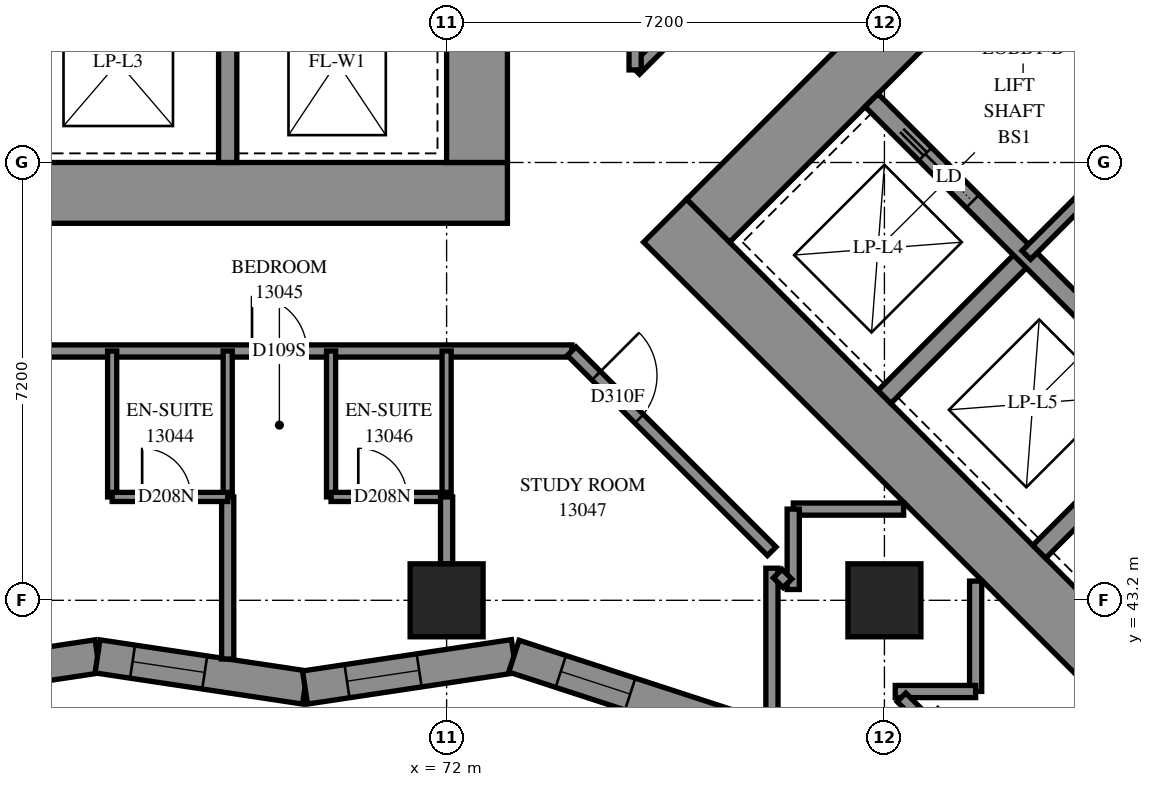
"""IFC4 building model, lengths in metres.
Left out: names, types, materials, properties, quantities, classifications, styles, units other than length and angle.
Written with IfcOpenShell. Run it as: python <this file> out.ifc"""

import sys

from ifc_helpers import new_model, si_unit, direction, frame, frame_2d, origin, origin_2d, place, context, subcontext, project, spatial, polyline, rectangle, outline, extrude, element, fill, save


model = new_model("IFC4")
c1 = context("Model", 3, precision=1e-05, world=origin(), true_north=direction((0.0, 1.0)))
c2 = subcontext(c1, "Body", "Model", "MODEL_VIEW")
j1 = project(units=[si_unit("LENGTHUNIT", "METRE"), si_unit("PLANEANGLEUNIT", "RADIAN")], contexts=[c1])
p1 = place(None, origin())
s1 = spatial("IfcSite", under=j1, at=p1, CompositionType="ELEMENT")
p2 = place(p1, origin())
s2 = spatial("IfcBuilding", under=s1, at=p2, CompositionType="ELEMENT")
p3 = place(p2, frame((0.0, 0.0, 50.8)))
s3 = spatial("IfcBuildingStorey", under=s2, at=p3, CompositionType="ELEMENT", Elevation=50.8)
for number, where, z_axis, x_axis in (
    (1, (72.0, 43.2, 0.0), (0.0, 0.0, 1.0), (1.0, 0.0, 0.0)),
    (2, (79.2, 43.2, 0.0), (0.0, 0.0, 1.0), (1.0, 0.0, 0.0)),
):
    element("IfcColumn", number, at=place(p3, frame(where, z_axis=z_axis, x_axis=x_axis)), inside=s3, PredefinedType="COLUMN", context=c2, shape_type="SweptSolid", body=[
        extrude(rectangle(XDim=1.2, YDim=1.2, at=origin_2d()), origin(), (0.0, 0.0, 1.0), 3.1),
    ])
p4 = place(p3, frame((56.6, 49.9, -0.3), z_axis=(0.0, 0.0, 1.0), x_axis=(1.0, 0.0, 0.0)))
e3 = element("IfcWall", 3, at=p4, inside=s3, PredefinedType="SHEAR", context=c2, shape_type="SweptSolid", body=[
    extrude(rectangle(XDim=16.4, YDim=1.0, at=frame_2d((8.2, 0.0))), origin(), (0.0, 0.0, 1.0), 2.7),
])
p5 = place(p3, frame((72.5, 50.4, -0.3), z_axis=(0.0, 0.0, 1.0), x_axis=(0.0, 1.0, 0.0)))
e4 = element("IfcWall", 4, at=p5, inside=s3, PredefinedType="SHEAR", context=c2, shape_type="SweptSolid", body=[
    extrude(rectangle(XDim=14.4, YDim=1.0, at=frame_2d((7.2, 0.0))), origin(), (0.0, 0.0, 1.0), 2.7),
])
p6 = place(p5, frame((4.55, 0.0, 0.3)))
e5 = element("IfcOpeningElement", 5, at=p6, cuts=e4, PredefinedType="OPENING", context=c2, shape_type="SweptSolid", body=[
    extrude(rectangle(XDim=1.1, YDim=2.1, at=frame_2d((0.55, 1.05))), frame((0.0, 0.51, 0.0), z_axis=(0.0, -1.0, 0.0), x_axis=(1.0, 0.0, 0.0)), (0.0, 0.0, 1.0), 1.02),
])
p7 = place(p5, frame((11.35, 0.0, 0.3)))
e6 = element("IfcOpeningElement", 6, at=p7, cuts=e4, PredefinedType="OPENING", context=c2, shape_type="SweptSolid", body=[
    extrude(rectangle(XDim=1.1, YDim=2.1, at=frame_2d((0.55, 1.05))), frame((0.0, 0.51, 0.0), z_axis=(0.0, -1.0, 0.0), x_axis=(1.0, 0.0, 0.0)), (0.0, 0.0, 1.0), 1.02),
])
p8 = place(p3, frame((68.4, 50.4, 0.0), z_axis=(0.0, 0.0, 1.0), x_axis=(0.0, 1.0, 0.0)))
e7 = element("IfcWall", 7, at=p8, inside=s3, PredefinedType="SOLIDWALL", context=c2, shape_type="SweptSolid", body=[
    extrude(rectangle(XDim=3.3, YDim=0.3, at=frame_2d((1.65, 0.0))), origin(), (0.0, 0.0, 1.0), 3.1),
])
p9 = place(p3, frame((75.594, 49.443, -0.3), z_axis=(0.0, 0.0, 1.0), x_axis=(0.7071037324, -0.70710983, 0.0)))
e8 = element("IfcWall", 8, at=p9, inside=s3, PredefinedType="SHEAR", context=c2, shape_type="SweptSolid", body=[
    extrude(rectangle(XDim=16.4, YDim=1.0, at=frame_2d((8.2, 0.0))), origin(), (0.0, 0.0, 1.0), 2.7),
])
p10 = place(p3, frame((76.301, 49.443, -0.3), z_axis=(0.0, 0.0, 1.0), x_axis=(0.7071067812, 0.7071067812, 0.0)))
e9 = element("IfcWall", 9, at=p10, inside=s3, PredefinedType="SHEAR", context=c2, shape_type="SweptSolid", body=[
    extrude(rectangle(XDim=14.4, YDim=1.0, at=frame_2d((7.2, 0.0))), origin(), (0.0, 0.0, 1.0), 2.7),
])
p11 = place(p10, frame((4.55, 0.0, 0.3)))
e10 = element("IfcOpeningElement", 10, at=p11, cuts=e9, PredefinedType="OPENING", context=c2, shape_type="SweptSolid", body=[
    extrude(rectangle(XDim=1.1, YDim=2.1, at=frame_2d((0.55, 1.05))), frame((0.0, 0.51, 0.0), z_axis=(0.0, -1.0, 0.0), x_axis=(1.0, 0.0, 0.0)), (0.0, 0.0, 1.0), 1.02),
])
p12 = place(p10, frame((11.35, 0.0, 0.3)))
e11 = element("IfcOpeningElement", 11, at=p12, cuts=e9, PredefinedType="OPENING", context=c2, shape_type="SweptSolid", body=[
    extrude(rectangle(XDim=1.1, YDim=2.1, at=frame_2d((0.55, 1.05))), frame((0.0, 0.51, 0.0), z_axis=(0.0, -1.0, 0.0), x_axis=(1.0, 0.0, 0.0)), (0.0, 0.0, 1.0), 1.02),
])
p13 = place(p3, frame((79.2, 46.544, 0.0), z_axis=(0.0, 0.0, 1.0), x_axis=(0.7071219326, 0.7070916295, 0.0)))
e12 = element("IfcWall", 12, at=p13, inside=s3, PredefinedType="SOLIDWALL", context=c2, shape_type="SweptSolid", body=[
    extrude(rectangle(XDim=3.3, YDim=0.3, at=frame_2d((1.65, 0.0))), origin(), (0.0, 0.0, 1.0), 3.1),
])
p14 = place(p3, frame((81.746, 43.999, 0.0), z_axis=(0.0, 0.0, 1.0), x_axis=(0.7071067812, 0.7071067812, 0.0)))
e13 = element("IfcWall", 13, at=p14, inside=s3, PredefinedType="SOLIDWALL", context=c2, shape_type="SweptSolid", body=[
    extrude(rectangle(XDim=3.3, YDim=0.3, at=frame_2d((1.65, 0.0))), origin(), (0.0, 0.0, 1.0), 3.1),
])
p15 = place(p3, frame((78.988, 51.423, 0.0), z_axis=(0.0, 0.0, 1.0), x_axis=(0.7071067812, -0.7071067812, 0.0)))
e14 = element("IfcWall", 14, at=p15, inside=s3, PredefinedType="SOLIDWALL", context=c2, shape_type="SweptSolid", body=[
    extrude(rectangle(XDim=14.4, YDim=0.3, at=frame_2d((7.2, 0.0))), origin(), (0.0, 0.0, 1.0), 3.1),
])
p16 = place(p15, frame((1.25, 0.0, 0.0)))
e15 = element("IfcOpeningElement", 15, at=p16, cuts=e14, PredefinedType="OPENING", context=c2, shape_type="SweptSolid", body=[
    extrude(rectangle(XDim=1.1, YDim=2.1, at=frame_2d((0.55, 1.05))), frame((0.0, 0.16, 0.0), z_axis=(0.0, -1.0, 0.0), x_axis=(1.0, 0.0, 0.0)), (0.0, 0.0, 1.0), 0.32),
])
p17 = place(p15, frame((4.85, 0.0, 0.0)))
e16 = element("IfcOpeningElement", 16, at=p17, cuts=e14, PredefinedType="OPENING", context=c2, shape_type="SweptSolid", body=[
    extrude(rectangle(XDim=1.1, YDim=2.1, at=frame_2d((0.55, 1.05))), frame((0.0, 0.16, 0.0), z_axis=(0.0, -1.0, 0.0), x_axis=(1.0, 0.0, 0.0)), (0.0, 0.0, 1.0), 0.32),
])
p18 = place(p15, frame((8.45, 0.0, 0.0)))
e17 = element("IfcOpeningElement", 17, at=p18, cuts=e14, PredefinedType="OPENING", context=c2, shape_type="SweptSolid", body=[
    extrude(rectangle(XDim=1.1, YDim=2.1, at=frame_2d((0.55, 1.05))), frame((0.0, 0.16, 0.0), z_axis=(0.0, -1.0, 0.0), x_axis=(1.0, 0.0, 0.0)), (0.0, 0.0, 1.0), 0.32),
])
p19 = place(p15, frame((12.05, 0.0, 0.0)))
e18 = element("IfcOpeningElement", 18, at=p19, cuts=e14, PredefinedType="OPENING", context=c2, shape_type="SweptSolid", body=[
    extrude(rectangle(XDim=1.1, YDim=2.1, at=frame_2d((0.55, 1.05))), frame((0.0, 0.16, 0.0), z_axis=(0.0, -1.0, 0.0), x_axis=(1.0, 0.0, 0.0)), (0.0, 0.0, 1.0), 0.32),
])
p20 = place(p3, frame((81.534, 53.969, 0.0), z_axis=(0.0, 0.0, 1.0), x_axis=(0.707103309, -0.7071102534, 0.0)))
e19 = element("IfcWall", 19, at=p20, inside=s3, PredefinedType="SOLIDWALL", context=c2, shape_type="SweptSolid", body=[
    extrude(rectangle(XDim=14.4, YDim=0.3, at=frame_2d((7.2, 0.0))), origin(), (0.0, 0.0, 1.0), 3.1),
])
p21 = place(p20, frame((12.05, 0.0, 0.0)))
e20 = element("IfcOpeningElement", 20, at=p21, cuts=e19, PredefinedType="OPENING", context=c2, shape_type="SweptSolid", body=[
    extrude(rectangle(XDim=1.1, YDim=2.1, at=frame_2d((0.55, 1.05))), frame((0.0, 0.16, 0.0), z_axis=(0.0, -1.0, 0.0), x_axis=(1.0, 0.0, 0.0)), (0.0, 0.0, 1.0), 0.32),
])
p22 = place(p3, frame((62.848, 41.766, 0.0), z_axis=(0.0, 0.0, 1.0), x_axis=(0.9889278474, 0.1483971447, 0.0)))
e21 = element("IfcWall", 21, at=p22, inside=s3, PredefinedType="SOLIDWALL", context=c2, shape_type="SweptSolid", body=[
    extrude(outline(polyline([(-0.041, -0.275), (3.409, -0.275), (3.491, 0.275), (0.041, 0.275), (-0.041, -0.275)])), origin(), (0.0, 0.0, 1.0), 3.1),
])
p23 = place(p22, frame((0.508, 0.0, 0.5)))
e22 = element("IfcOpeningElement", 22, at=p23, cuts=e21, PredefinedType="OPENING", context=c2, shape_type="SweptSolid", body=[
    extrude(rectangle(XDim=1.2, YDim=2.45, at=frame_2d((0.6, 1.225))), frame((0.0, 0.285, 0.0), z_axis=(0.0, -1.0, 0.0), x_axis=(1.0, 0.0, 0.0)), (0.0, 0.0, 1.0), 0.57),
])
p24 = place(p3, frame((66.26, 42.278, 0.0), z_axis=(0.0, 0.0, 1.0), x_axis=(0.9889272091, -0.1484013984, 0.0)))
e23 = element("IfcWall", 23, at=p24, inside=s3, PredefinedType="SOLIDWALL", context=c2, shape_type="SweptSolid", body=[
    extrude(outline(polyline([(0.041, -0.275), (3.491, -0.275), (3.409, 0.275), (-0.041, 0.275), (0.041, -0.275)])), origin(), (0.0, 0.0, 1.0), 3.1),
])
p25 = place(p24, frame((0.582, 0.0, 0.5)))
e24 = element("IfcOpeningElement", 24, at=p25, cuts=e23, PredefinedType="OPENING", context=c2, shape_type="SweptSolid", body=[
    extrude(rectangle(XDim=1.2, YDim=2.45, at=frame_2d((0.6, 1.225))), frame((0.0, 0.285, 0.0), z_axis=(0.0, -1.0, 0.0), x_axis=(1.0, 0.0, 0.0)), (0.0, 0.0, 1.0), 0.57),
])
p26 = place(p3, frame((69.671, 41.766, 0.0), z_axis=(0.0, 0.0, 1.0), x_axis=(0.9889276939, 0.1483981679, 0.0)))
e25 = element("IfcWall", 25, at=p26, inside=s3, PredefinedType="SOLIDWALL", context=c2, shape_type="SweptSolid", body=[
    extrude(outline(polyline([(-0.041, -0.275), (3.409, -0.275), (3.539, 0.275), (0.041, 0.275), (-0.041, -0.275)])), origin(), (0.0, 0.0, 1.0), 3.1),
])
p27 = place(p26, frame((0.698, 0.0, 0.5)))
e26 = element("IfcOpeningElement", 26, at=p27, cuts=e25, PredefinedType="OPENING", context=c2, shape_type="SweptSolid", body=[
    extrude(rectangle(XDim=1.2, YDim=2.45, at=frame_2d((0.6, 1.225))), frame((0.0, 0.285, 0.0), z_axis=(0.0, -1.0, 0.0), x_axis=(1.0, 0.0, 0.0)), (0.0, 0.0, 1.0), 0.57),
])
p28 = place(p3, frame((73.107, 42.282, 0.0), z_axis=(0.0, 0.0, 1.0), x_axis=(0.9507763202, -0.3098780227, 0.0)))
e27 = element("IfcWall", 27, at=p28, inside=s3, PredefinedType="SOLIDWALL", context=c2, shape_type="SweptSolid", body=[
    extrude(outline(polyline([(0.065, -0.275), (3.654, -0.275), (3.706, 0.275), (-0.065, 0.275), (0.065, -0.275)])), origin(), (0.0, 0.0, 1.0), 3.1),
])
p29 = place(p28, frame((0.811, 0.0, 0.5)))
e28 = element("IfcOpeningElement", 28, at=p29, cuts=e27, PredefinedType="OPENING", context=c2, shape_type="SweptSolid", body=[
    extrude(rectangle(XDim=1.2, YDim=2.45, at=frame_2d((0.6, 1.225))), frame((0.0, 0.285, 0.0), z_axis=(0.0, -1.0, 0.0), x_axis=(1.0, 0.0, 0.0)), (0.0, 0.0, 1.0), 0.57),
])
p30 = place(p3, frame((81.534, 48.878, 0.0), z_axis=(0.0, 0.0, 1.0), x_axis=(0.707092892, 0.7071206701, 0.0)))
e29 = element("IfcWall", 29, at=p30, inside=s3, PredefinedType="PARTITIONING", context=c2, shape_type="SweptSolid", body=[
    extrude(rectangle(XDim=3.6, YDim=0.2, at=frame_2d((1.8, 0.0))), origin(), (0.0, 0.0, 1.0), 3.1),
])
p31 = place(p3, frame((54.5, 47.3, 0.0), z_axis=(0.0, 0.0, 1.0), x_axis=(1.0, 0.0, 0.0)))
e30 = element("IfcWall", 30, at=p31, inside=s3, PredefinedType="PARTITIONING", context=c2, shape_type="SweptSolid", body=[
    extrude(rectangle(XDim=19.56, YDim=0.2, at=frame_2d((9.78, 0.0))), origin(), (0.0, 0.0, 1.0), 3.1),
])
p32 = place(p31, frame((0.23, 0.0, 0.0)))
e31 = element("IfcOpeningElement", 31, at=p32, cuts=e30, PredefinedType="OPENING", context=c2, shape_type="SweptSolid", body=[
    extrude(rectangle(XDim=1.0, YDim=2.1, at=frame_2d((0.5, 1.05))), frame((0.0, 0.11, 0.0), z_axis=(0.0, -1.0, 0.0), x_axis=(1.0, 0.0, 0.0)), (0.0, 0.0, 1.0), 0.22),
])
p33 = place(p31, frame((5.4, 0.0, 0.0)))
e32 = element("IfcOpeningElement", 32, at=p33, cuts=e30, PredefinedType="OPENING", context=c2, shape_type="SweptSolid", body=[
    extrude(rectangle(XDim=0.9, YDim=2.1, at=frame_2d((0.45, 1.05))), frame((0.0, 0.11, 0.0), z_axis=(0.0, -1.0, 0.0), x_axis=(1.0, 0.0, 0.0)), (0.0, 0.0, 1.0), 0.22),
])
p34 = place(p31, frame((9.001, 0.0, 0.0)))
e33 = element("IfcOpeningElement", 33, at=p34, cuts=e30, PredefinedType="OPENING", context=c2, shape_type="SweptSolid", body=[
    extrude(rectangle(XDim=0.9, YDim=2.1, at=frame_2d((0.45, 1.05))), frame((0.0, 0.11, 0.0), z_axis=(0.0, -1.0, 0.0), x_axis=(1.0, 0.0, 0.0)), (0.0, 0.0, 1.0), 0.22),
])
p35 = place(p31, frame((14.3, 0.0, 0.0)))
e34 = element("IfcOpeningElement", 34, at=p35, cuts=e30, PredefinedType="OPENING", context=c2, shape_type="SweptSolid", body=[
    extrude(rectangle(XDim=0.9, YDim=2.1, at=frame_2d((0.45, 1.05))), frame((0.0, 0.11, 0.0), z_axis=(0.0, -1.0, 0.0), x_axis=(1.0, 0.0, 0.0)), (0.0, 0.0, 1.0), 0.22),
])
p36 = place(p3, frame((74.057, 47.297, 0.0), z_axis=(0.0, 0.0, 1.0), x_axis=(0.7071067812, -0.7071067812, 0.0)))
e35 = element("IfcWall", 35, at=p36, inside=s3, PredefinedType="PARTITIONING", context=c2, shape_type="SweptSolid", body=[
    extrude(rectangle(XDim=4.653, YDim=0.2, at=frame_2d((2.326, 0.0))), origin(), (0.0, 0.0, 1.0), 3.1),
])
p37 = place(p36, frame((0.57, 0.0, 0.0)))
e36 = element("IfcOpeningElement", 36, at=p37, cuts=e35, PredefinedType="OPENING", context=c2, shape_type="SweptSolid", body=[
    extrude(rectangle(XDim=1.0, YDim=2.1, at=frame_2d((0.5, 1.05))), frame((0.0, 0.11, 0.0), z_axis=(0.0, -1.0, 0.0), x_axis=(1.0, 0.0, 0.0)), (0.0, 0.0, 1.0), 0.22),
])
p38 = place(p3, frame((77.35, 41.043, 0.0), z_axis=(0.0, 0.0, 1.0), x_axis=(0.0, 1.0, 0.0)))
e37 = element("IfcWall", 37, at=p38, inside=s3, PredefinedType="PARTITIONING", context=c2, shape_type="SweptSolid", body=[
    extrude(rectangle(XDim=2.685, YDim=0.2, at=frame_2d((1.342, 0.0))), origin(), (0.0, 0.0, 1.0), 3.1),
])
p39 = place(p3, frame((68.4, 42.235, 0.0), z_axis=(0.0, 0.0, 1.0), x_axis=(0.0, 1.0, 0.0)))
e38 = element("IfcWall", 38, at=p39, inside=s3, PredefinedType="PARTITIONING", context=c2, shape_type="SweptSolid", body=[
    extrude(rectangle(XDim=2.665, YDim=0.2, at=frame_2d((1.333, 0.0))), origin(), (0.0, 0.0, 1.0), 3.1),
])
for number, where, z_axis, x_axis in (
    (39, (66.5, 44.9, 0.0), (0.0, 0.0, 1.0), (0.0, 1.0, 0.0)),
    (40, (68.4, 44.9, 0.0), (0.0, 0.0, 1.0), (0.0, 1.0, 0.0)),
    (41, (70.1, 44.9, 0.0), (0.0, 0.0, 1.0), (0.0, 1.0, 0.0)),
    (42, (72.0, 44.9, 0.0), (0.0, 0.0, 1.0), (0.0, 1.0, 0.0)),
):
    element("IfcWall", number, at=place(p3, frame(where, z_axis=z_axis, x_axis=x_axis)), inside=s3, PredefinedType="PARTITIONING", context=c2, shape_type="SweptSolid", body=[
        extrude(rectangle(XDim=2.4, YDim=0.15, at=frame_2d((1.2, 0.0))), origin(), (0.0, 0.0, 1.0), 3.1),
    ])
p40 = place(p3, frame((66.5, 44.9, 0.0), z_axis=(0.0, 0.0, 1.0), x_axis=(1.0, 0.0, 0.0)))
e43 = element("IfcWall", 43, at=p40, inside=s3, PredefinedType="PARTITIONING", context=c2, shape_type="SweptSolid", body=[
    extrude(rectangle(XDim=1.9, YDim=0.15, at=frame_2d((0.95, 0.0))), origin(), (0.0, 0.0, 1.0), 3.1),
])
p41 = place(p40, frame((0.493, 0.0, 0.0)))
e44 = element("IfcOpeningElement", 44, at=p41, cuts=e43, PredefinedType="OPENING", context=c2, shape_type="SweptSolid", body=[
    extrude(rectangle(XDim=0.8, YDim=2.1, at=frame_2d((0.4, 1.05))), frame((0.0, 0.085, 0.0), z_axis=(0.0, -1.0, 0.0), x_axis=(1.0, 0.0, 0.0)), (0.0, 0.0, 1.0), 0.17),
])
p42 = place(p3, frame((70.1, 44.9, 0.0), z_axis=(0.0, 0.0, 1.0), x_axis=(1.0, 0.0, 0.0)))
e45 = element("IfcWall", 45, at=p42, inside=s3, PredefinedType="PARTITIONING", context=c2, shape_type="SweptSolid", body=[
    extrude(rectangle(XDim=1.9, YDim=0.15, at=frame_2d((0.95, 0.0))), origin(), (0.0, 0.0, 1.0), 3.1),
])
p43 = place(p42, frame((0.448, 0.0, 0.0)))
e46 = element("IfcOpeningElement", 46, at=p43, cuts=e45, PredefinedType="OPENING", context=c2, shape_type="SweptSolid", body=[
    extrude(rectangle(XDim=0.8, YDim=2.1, at=frame_2d((0.4, 1.05))), frame((0.0, 0.085, 0.0), z_axis=(0.0, -1.0, 0.0), x_axis=(1.0, 0.0, 0.0)), (0.0, 0.0, 1.0), 0.17),
])
for number, where, z_axis, x_axis in (
    (47, (77.702, 44.7, 0.0), (0.0, 0.0, 1.0), (1.0, 0.0, 0.0)),
    (48, (80.7, 41.702, 0.0), (0.0, 0.0, 1.0), (0.0, 1.0, 0.0)),
):
    element("IfcWall", number, at=place(p3, frame(where, z_axis=z_axis, x_axis=x_axis)), inside=s3, PredefinedType="PARTITIONING", context=c2, shape_type="SweptSolid", body=[
        extrude(rectangle(XDim=1.814, YDim=0.2, at=frame_2d((0.907, 0.0))), origin(), (0.0, 0.0, 1.0), 3.1),
    ])
p44 = place(p3, frame((75.102, 51.922, 0.0), z_axis=(0.0, 0.0, 1.0), x_axis=(0.7071067812, 0.7071067812, 0.0)))
e49 = element("IfcWall", 49, at=p44, inside=s3, PredefinedType="PARTITIONING", context=c2, shape_type="SweptSolid", body=[
    extrude(rectangle(XDim=1.663, YDim=0.2, at=frame_2d((0.832, 0.0))), origin(), (0.0, 0.0, 1.0), 3.1),
])
for number, where, z_axis, x_axis in (
    (50, (77.7, 43.378, 0.0), (0.0, 0.0, 1.0), (0.0, 1.0, 0.0)),
    (51, (79.378, 41.7, 0.0), (0.0, 0.0, 1.0), (1.0, 0.0, 0.0)),
):
    element("IfcWall", number, at=place(p3, frame(where, z_axis=z_axis, x_axis=x_axis)), inside=s3, PredefinedType="PARTITIONING", context=c2, shape_type="SweptSolid", body=[
        extrude(rectangle(XDim=1.322, YDim=0.2, at=frame_2d((0.661, 0.0))), origin(), (0.0, 0.0, 1.0), 3.1),
    ])
p45 = place(p3, frame((75.1, 51.922, 0.0), z_axis=(0.0, 0.0, 1.0), x_axis=(0.0, 1.0, 0.0)))
e52 = element("IfcWall", 52, at=p45, inside=s3, PredefinedType="PARTITIONING", context=c2, shape_type="SweptSolid", body=[
    extrude(rectangle(XDim=1.178, YDim=0.2, at=frame_2d((0.589, 0.0))), origin(), (0.0, 0.0, 1.0), 3.1),
])
p46 = place(p3, frame((72.0, 43.8, 0.0), z_axis=(0.0, 0.0, 1.0), x_axis=(0.0, 1.0, 0.0)))
e53 = element("IfcWall", 53, at=p46, inside=s3, PredefinedType="PARTITIONING", context=c2, shape_type="SweptSolid", body=[
    extrude(rectangle(XDim=1.1, YDim=0.2, at=frame_2d((0.55, 0.0))), origin(), (0.0, 0.0, 1.0), 3.1),
])
p47 = place(p3, frame((77.445, 43.64, 0.0), z_axis=(0.0, 0.0, 1.0), x_axis=(0.7071067812, -0.7071067812, 0.0)))
e54 = element("IfcWall", 54, at=p47, inside=s3, PredefinedType="PARTITIONING", context=c2, shape_type="SweptSolid", body=[
    extrude(rectangle(XDim=0.225, YDim=0.2, at=frame_2d((0.113, 0.0))), origin(), (0.0, 0.0, 1.0), 3.1),
])
p48 = place(p3, frame((79.481, 41.605, 0.0), z_axis=(0.0, 0.0, 1.0), x_axis=(0.7071067812, -0.7071067812, 0.0)))
e55 = element("IfcWall", 55, at=p48, inside=s3, PredefinedType="PARTITIONING", context=c2, shape_type="SweptSolid", body=[
    extrude(rectangle(XDim=0.355, YDim=0.2, at=frame_2d((0.177, 0.0))), origin(), (0.0, 0.0, 1.0), 3.1),
])
p49 = place(p25, origin())
e56 = element("IfcWindow", 56, at=p49, inside=s3, PartitioningType="SINGLE_PANEL", PredefinedType="WINDOW", context=c2, shape_type="SweptSolid", body=[
    extrude(rectangle(XDim=1.2, YDim=2.45, at=frame_2d((0.6, 1.225))), frame((0.0, 0.155, 0.0), z_axis=(0.0, -1.0, 0.0), x_axis=(1.0, 0.0, 0.0)), (0.0, 0.0, 1.0), 0.06),
])
fill(e24, e56)
p50 = place(p27, origin())
e57 = element("IfcWindow", 57, at=p50, inside=s3, PartitioningType="SINGLE_PANEL", PredefinedType="WINDOW", context=c2, shape_type="SweptSolid", body=[
    extrude(rectangle(XDim=1.2, YDim=2.45, at=frame_2d((0.6, 1.225))), frame((0.0, 0.155, 0.0), z_axis=(0.0, -1.0, 0.0), x_axis=(1.0, 0.0, 0.0)), (0.0, 0.0, 1.0), 0.06),
])
fill(e26, e57)
p51 = place(p29, origin())
e58 = element("IfcWindow", 58, at=p51, inside=s3, PartitioningType="SINGLE_PANEL", PredefinedType="WINDOW", context=c2, shape_type="SweptSolid", body=[
    extrude(rectangle(XDim=1.2, YDim=2.45, at=frame_2d((0.6, 1.225))), frame((0.0, 0.155, 0.0), z_axis=(0.0, -1.0, 0.0), x_axis=(1.0, 0.0, 0.0)), (0.0, 0.0, 1.0), 0.06),
])
fill(e28, e58)
p52 = place(p16, origin())
e59 = element("IfcDoor", 59, at=p52, inside=s3, OperationType="SLIDING_TO_LEFT", PredefinedType="DOOR", context=c2, shape_type="SweptSolid", body=[
    extrude(rectangle(XDim=1.1, YDim=2.1, at=frame_2d((0.55, 1.05))), frame((0.0, 0.025, 0.0), z_axis=(0.0, -1.0, 0.0), x_axis=(1.0, 0.0, 0.0)), (0.0, 0.0, 1.0), 0.05),
])
fill(e15, e59)
p53 = place(p41, origin())
e60 = element("IfcDoor", 60, at=p53, inside=s3, OperationType="SINGLE_SWING_RIGHT", PredefinedType="DOOR", context=c2, shape_type="SweptSolid", body=[
    extrude(rectangle(XDim=0.8, YDim=2.1, at=frame_2d((0.4, 1.05))), frame((0.0, 0.025, 0.0), z_axis=(0.0, -1.0, 0.0), x_axis=(1.0, 0.0, 0.0)), (0.0, 0.0, 1.0), 0.05),
])
fill(e44, e60)
p54 = place(p35, origin())
e61 = element("IfcDoor", 61, at=p54, inside=s3, OperationType="SINGLE_SWING_RIGHT", PredefinedType="DOOR", context=c2, shape_type="SweptSolid", body=[
    extrude(rectangle(XDim=0.9, YDim=2.1, at=frame_2d((0.45, 1.05))), frame((0.0, 0.025, 0.0), z_axis=(0.0, -1.0, 0.0), x_axis=(1.0, 0.0, 0.0)), (0.0, 0.0, 1.0), 0.05),
])
fill(e34, e61)
p55 = place(p43, origin())
e62 = element("IfcDoor", 62, at=p55, inside=s3, OperationType="SINGLE_SWING_RIGHT", PredefinedType="DOOR", context=c2, shape_type="SweptSolid", body=[
    extrude(rectangle(XDim=0.8, YDim=2.1, at=frame_2d((0.4, 1.05))), frame((0.0, 0.025, 0.0), z_axis=(0.0, -1.0, 0.0), x_axis=(1.0, 0.0, 0.0)), (0.0, 0.0, 1.0), 0.05),
])
fill(e46, e62)
p56 = place(p37, origin())
e63 = element("IfcDoor", 63, at=p56, inside=s3, OperationType="SINGLE_SWING_LEFT", PredefinedType="DOOR", context=c2, shape_type="SweptSolid", body=[
    extrude(rectangle(XDim=1.0, YDim=2.1, at=frame_2d((0.5, 1.05))), frame((0.0, 0.025, 0.0), z_axis=(0.0, -1.0, 0.0), x_axis=(1.0, 0.0, 0.0)), (0.0, 0.0, 1.0), 0.05),
])
fill(e36, e63)
save(model, sys.argv[1])
